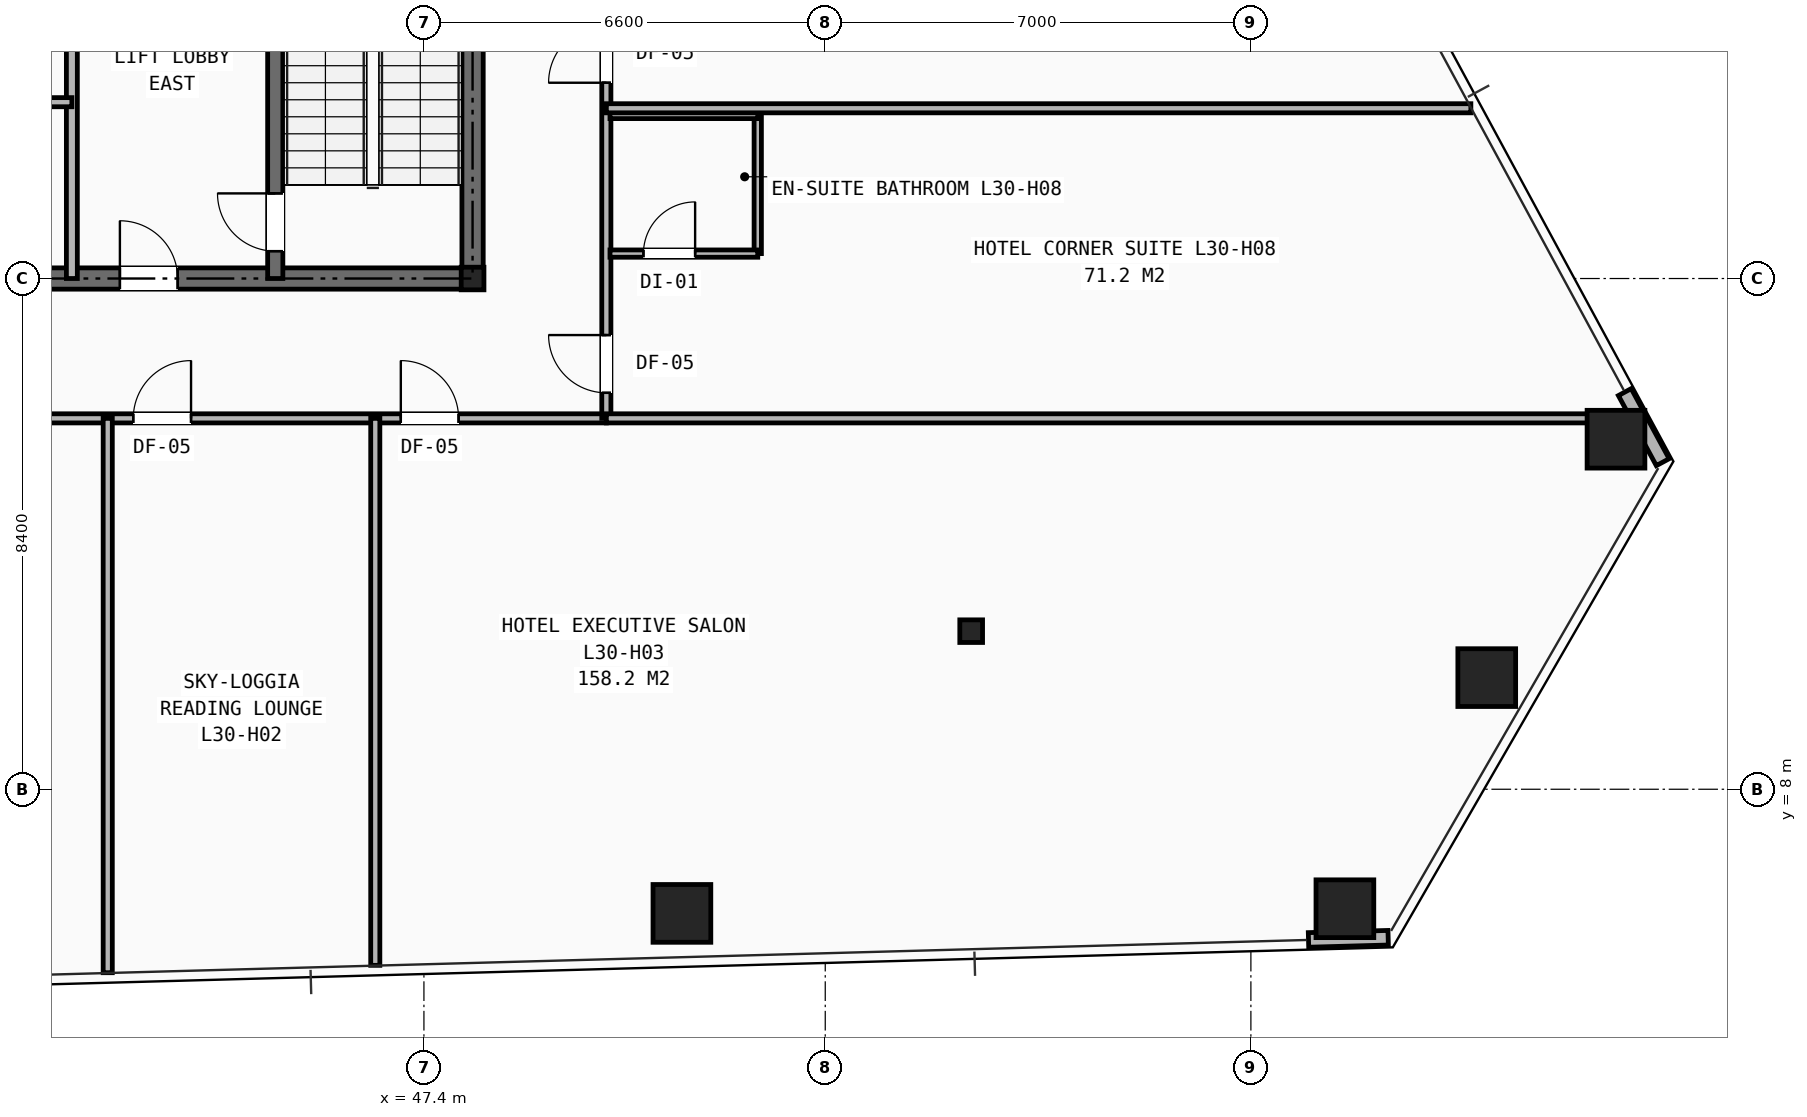
"""IFC4 building model, lengths in metres.
Left out: names, types, materials, properties, quantities, classifications, styles, units other than length and angle.
Written with IfcOpenShell. Run it as: python <this file> out.ifc"""

import sys

from ifc_helpers import new_model, si_unit, direction, frame, frame_2d, origin, origin_2d, place, context, subcontext, project, spatial, rectangle, hollow_rectangle, i_section, extrude, element, fill, save


model = new_model("IFC4")
c1 = context("Model", 3, precision=1e-05, world=origin(), true_north=direction((0.0, 1.0)))
c2 = subcontext(c1, "Body", "Model", "MODEL_VIEW")
j1 = project(units=[si_unit("LENGTHUNIT", "METRE"), si_unit("PLANEANGLEUNIT", "RADIAN")], contexts=[c1])
p1 = place(None, origin())
s1 = spatial("IfcSite", under=j1, at=p1, CompositionType="ELEMENT")
p2 = place(p1, origin())
s2 = spatial("IfcBuilding", under=s1, at=p2, CompositionType="ELEMENT")
p3 = place(p2, frame((0.0, 0.0, 105.4)))
s3 = spatial("IfcBuildingStorey", under=s2, at=p3, CompositionType="ELEMENT", Elevation=105.4)
for number, where, z_axis, x_axis in (
    (1, (48.2, 16.4, 0.0), (0.0, 0.0, 1.0), (1.0, 0.0, 0.0)),
    (2, (56.4, 10.6, 0.0), (0.0, 0.0, 1.0), (1.0, 0.0, 0.0)),
):
    element("IfcColumn", number, at=place(p3, frame(where, z_axis=z_axis, x_axis=x_axis)), inside=s3, PredefinedType="COLUMN", context=c2, shape_type="SweptSolid", body=[
        extrude(i_section(OverallWidth=0.374, OverallDepth=0.372, WebThickness=0.016, FlangeThickness=0.026, at=origin_2d()), origin(), (0.0, 0.0, 1.0), 3.2),
    ])
for number, where, z_axis, x_axis in (
    (3, (51.643, 5.958, 0.0), (0.0, 0.0, 1.0), (1.0, 0.0, 0.0)),
    (4, (62.546, 6.035, 0.0), (0.0, 0.0, 1.0), (1.0, 0.0, 0.0)),
    (5, (64.879, 9.836, 0.0), (0.0, 0.0, 1.0), (1.0, 0.0, 0.0)),
    (6, (67.004, 13.757, 0.0), (0.0, 0.0, 1.0), (1.0, 0.0, 0.0)),
):
    element("IfcColumn", number, at=place(p3, frame(where, z_axis=z_axis, x_axis=x_axis)), inside=s3, PredefinedType="COLUMN", context=c2, shape_type="SweptSolid", body=[
        extrude(hollow_rectangle(XDim=0.95, YDim=0.95, WallThickness=0.065, at=origin_2d()), origin(), (0.0, 0.0, 1.0), 3.2),
    ])
p4 = place(p3, frame((61.948, 5.522, 0.0), z_axis=(0.0, 0.0, 1.0), x_axis=(0.999614564295, 0.027761895635, 0.0)))
e7 = element("IfcWall", 7, at=p4, inside=s3, PredefinedType="SHEAR", context=c2, shape_type="SweptSolid", body=[
    extrude(rectangle(XDim=1.31, YDim=0.24, at=frame_2d((0.655, 0.0))), origin(), (0.0, 0.0, 1.0), 2.253),
])
p5 = place(p3, frame((67.773, 13.379, 0.0), z_axis=(0.0, 0.0, 1.0), x_axis=(-0.475820948293, 0.879542167929, 0.0)))
e8 = element("IfcWall", 8, at=p5, inside=s3, PredefinedType="SHEAR", context=c2, shape_type="SweptSolid", body=[
    extrude(rectangle(XDim=1.311, YDim=0.24, at=frame_2d((0.655, 0.0))), origin(), (0.0, 0.0, 1.0), 2.253),
])
p6 = place(p3, frame((31.8, 16.4, 0.0), z_axis=(0.0, 0.0, 1.0), x_axis=(1.0, 0.0, 0.0)))
e9 = element("IfcWall", 9, at=p6, inside=s3, PredefinedType="SHEAR", context=c2, shape_type="SweptSolid", body=[
    extrude(rectangle(XDim=16.4, YDim=0.35, at=frame_2d((8.2, 0.0))), origin(), (0.0, 0.0, 1.0), 2.97),
])
p7 = place(p6, frame((7.75, 0.0, 0.0)))
e10 = element("IfcOpeningElement", 10, at=p7, cuts=e9, PredefinedType="OPENING", context=c2, shape_type="SweptSolid", body=[
    extrude(rectangle(XDim=0.9, YDim=2.1, at=frame_2d((0.45, 1.05))), frame((0.0, 0.185, 0.0), z_axis=(0.0, -1.0, 0.0), x_axis=(1.0, 0.0, 0.0)), (0.0, 0.0, 1.0), 0.37),
])
p8 = place(p6, frame((4.2, 0.0, 0.0)))
e11 = element("IfcOpeningElement", 11, at=p8, cuts=e9, PredefinedType="OPENING", context=c2, shape_type="SweptSolid", body=[
    extrude(rectangle(XDim=0.95, YDim=2.1, at=frame_2d((0.475, 1.05))), frame((0.0, 0.185, 0.0), z_axis=(0.0, -1.0, 0.0), x_axis=(1.0, 0.0, 0.0)), (0.0, 0.0, 1.0), 0.37),
])
p9 = place(p6, frame((10.6, 0.0, 0.0)))
e12 = element("IfcOpeningElement", 12, at=p9, cuts=e9, PredefinedType="OPENING", context=c2, shape_type="SweptSolid", body=[
    extrude(rectangle(XDim=0.95, YDim=2.1, at=frame_2d((0.475, 1.05))), frame((0.0, 0.185, 0.0), z_axis=(0.0, -1.0, 0.0), x_axis=(1.0, 0.0, 0.0)), (0.0, 0.0, 1.0), 0.37),
])
p10 = place(p3, frame((48.2, 16.4, 0.0), z_axis=(0.0, 0.0, 1.0), x_axis=(0.0, 1.0, 0.0)))
e13 = element("IfcWall", 13, at=p10, inside=s3, PredefinedType="SHEAR", context=c2, shape_type="SweptSolid", body=[
    extrude(rectangle(XDim=14.8, YDim=0.35, at=frame_2d((7.4, 0.0))), origin(), (0.0, 0.0, 1.0), 2.97),
])
p11 = place(p10, frame((11.0, 0.0, 0.0)))
e14 = element("IfcOpeningElement", 14, at=p11, cuts=e13, PredefinedType="OPENING", context=c2, shape_type="SweptSolid", body=[
    extrude(rectangle(XDim=1.1, YDim=2.15, at=frame_2d((0.55, 1.075))), frame((0.0, 0.185, 0.0), z_axis=(0.0, -1.0, 0.0), x_axis=(1.0, 0.0, 0.0)), (0.0, 0.0, 1.0), 0.37),
])
p12 = place(p3, frame((44.955, 16.4, 0.0), z_axis=(0.0, 0.0, 1.0), x_axis=(0.0, 1.0, 0.0)))
e15 = element("IfcWall", 15, at=p12, inside=s3, PredefinedType="SHEAR", context=c2, shape_type="SweptSolid", body=[
    extrude(rectangle(XDim=8.4, YDim=0.25, at=frame_2d((4.2, 0.0))), origin(), (0.0, 0.0, 1.0), 2.97),
])
p13 = place(p12, frame((0.45, 0.0, 0.0)))
e16 = element("IfcOpeningElement", 16, at=p13, cuts=e15, PredefinedType="OPENING", context=c2, shape_type="SweptSolid", body=[
    extrude(rectangle(XDim=0.95, YDim=2.1, at=frame_2d((0.475, 1.05))), frame((0.0, 0.135, 0.0), z_axis=(0.0, -1.0, 0.0), x_axis=(1.0, 0.0, 0.0)), (0.0, 0.0, 1.0), 0.27),
])
p14 = place(p3, frame((41.61, 16.4, 0.0), z_axis=(0.0, 0.0, 1.0), x_axis=(0.0, 1.0, 0.0)))
e17 = element("IfcWall", 17, at=p14, inside=s3, PredefinedType="PARTITIONING", context=c2, shape_type="SweptSolid", body=[
    extrude(rectangle(XDim=8.4, YDim=0.18, at=frame_2d((4.2, 0.0))), origin(), (0.0, 0.0, 1.0), 2.698),
])
p15 = place(p3, frame((38.39, 19.3, 0.0), z_axis=(0.0, 0.0, 1.0), x_axis=(1.0, 0.0, 0.0)))
e18 = element("IfcWall", 18, at=p15, inside=s3, PredefinedType="PARTITIONING", context=c2, shape_type="SweptSolid", body=[
    extrude(rectangle(XDim=3.22, YDim=0.15, at=frame_2d((1.61, 0.0))), origin(), (0.0, 0.0, 1.0), 2.97),
])
p16 = place(p3, frame((29.6, 14.1, 0.0), z_axis=(0.0, 0.0, 1.0), x_axis=(1.0, 0.0, 0.0)))
e19 = element("IfcWall", 19, at=p16, inside=s3, PredefinedType="PARTITIONING", context=c2, shape_type="SweptSolid", body=[
    extrude(rectangle(XDim=20.8, YDim=0.15, at=frame_2d((10.4, 0.0))), origin(), (0.0, 0.0, 1.0), 2.421),
])
p17 = place(p16, frame((0.57, 0.0, 0.0)))
e20 = element("IfcOpeningElement", 20, at=p17, cuts=e19, PredefinedType="OPENING", context=c2, shape_type="SweptSolid", body=[
    extrude(rectangle(XDim=0.95, YDim=2.1, at=frame_2d((0.475, 1.05))), frame((0.0, 0.085, 0.0), z_axis=(0.0, -1.0, 0.0), x_axis=(1.0, 0.0, 0.0)), (0.0, 0.0, 1.0), 0.17),
])
p18 = place(p16, frame((13.02, 0.0, 0.0)))
e21 = element("IfcOpeningElement", 21, at=p18, cuts=e19, PredefinedType="OPENING", context=c2, shape_type="SweptSolid", body=[
    extrude(rectangle(XDim=0.95, YDim=2.1, at=frame_2d((0.475, 1.05))), frame((0.0, 0.085, 0.0), z_axis=(0.0, -1.0, 0.0), x_axis=(1.0, 0.0, 0.0)), (0.0, 0.0, 1.0), 0.17),
])
p19 = place(p16, frame((17.42, 0.0, 0.0)))
e22 = element("IfcOpeningElement", 22, at=p19, cuts=e19, PredefinedType="OPENING", context=c2, shape_type="SweptSolid", body=[
    extrude(rectangle(XDim=0.95, YDim=2.1, at=frame_2d((0.475, 1.05))), frame((0.0, 0.085, 0.0), z_axis=(0.0, -1.0, 0.0), x_axis=(1.0, 0.0, 0.0)), (0.0, 0.0, 1.0), 0.17),
])
p20 = place(p3, frame((50.4, 14.1, 0.0), z_axis=(0.0, 0.0, 1.0), x_axis=(0.0, 1.0, 0.0)))
e23 = element("IfcWall", 23, at=p20, inside=s3, PredefinedType="PARTITIONING", context=c2, shape_type="SweptSolid", body=[
    extrude(rectangle(XDim=21.9, YDim=0.15, at=frame_2d((10.95, 0.0))), origin(), (0.0, 0.0, 1.0), 2.421),
])
p21 = place(p20, frame((0.42, 0.0, 0.0)))
e24 = element("IfcOpeningElement", 24, at=p21, cuts=e23, PredefinedType="OPENING", context=c2, shape_type="SweptSolid", body=[
    extrude(rectangle(XDim=0.95, YDim=2.1, at=frame_2d((0.475, 1.05))), frame((0.0, 0.085, 0.0), z_axis=(0.0, -1.0, 0.0), x_axis=(1.0, 0.0, 0.0)), (0.0, 0.0, 1.0), 0.17),
])
p22 = place(p20, frame((5.52, 0.0, 0.0)))
e25 = element("IfcOpeningElement", 25, at=p22, cuts=e23, PredefinedType="OPENING", context=c2, shape_type="SweptSolid", body=[
    extrude(rectangle(XDim=0.95, YDim=2.1, at=frame_2d((0.475, 1.05))), frame((0.0, 0.085, 0.0), z_axis=(0.0, -1.0, 0.0), x_axis=(1.0, 0.0, 0.0)), (0.0, 0.0, 1.0), 0.17),
])
p23 = place(p20, frame((10.92, 0.0, 0.0)))
e26 = element("IfcOpeningElement", 26, at=p23, cuts=e23, PredefinedType="OPENING", context=c2, shape_type="SweptSolid", body=[
    extrude(rectangle(XDim=0.95, YDim=2.1, at=frame_2d((0.475, 1.05))), frame((0.0, 0.085, 0.0), z_axis=(0.0, -1.0, 0.0), x_axis=(1.0, 0.0, 0.0)), (0.0, 0.0, 1.0), 0.17),
])
p24 = place(p20, frame((16.72, 0.0, 0.0)))
e27 = element("IfcOpeningElement", 27, at=p24, cuts=e23, PredefinedType="OPENING", context=c2, shape_type="SweptSolid", body=[
    extrude(rectangle(XDim=0.95, YDim=2.1, at=frame_2d((0.475, 1.05))), frame((0.0, 0.085, 0.0), z_axis=(0.0, -1.0, 0.0), x_axis=(1.0, 0.0, 0.0)), (0.0, 0.0, 1.0), 0.17),
])
p25 = place(p3, frame((42.2, 4.983, 0.0), z_axis=(0.0, 0.0, 1.0), x_axis=(0.0, 1.0, 0.0)))
e28 = element("IfcWall", 28, at=p25, inside=s3, PredefinedType="PARTITIONING", context=c2, shape_type="SweptSolid", body=[
    extrude(rectangle(XDim=9.117, YDim=0.15, at=frame_2d((4.559, 0.0))), origin(), (0.0, 0.0, 1.0), 2.258),
])
p26 = place(p3, frame((46.6, 5.104, 0.0), z_axis=(0.0, 0.0, 1.0), x_axis=(0.0, 1.0, 0.0)))
e29 = element("IfcWall", 29, at=p26, inside=s3, PredefinedType="PARTITIONING", context=c2, shape_type="SweptSolid", body=[
    extrude(rectangle(XDim=8.996, YDim=0.15, at=frame_2d((4.498, 0.0))), origin(), (0.0, 0.0, 1.0), 2.258),
])
p27 = place(p3, frame((50.4, 14.1, 0.0), z_axis=(0.0, 0.0, 1.0), x_axis=(1.0, 0.0, 0.0)))
e30 = element("IfcWall", 30, at=p27, inside=s3, PredefinedType="PARTITIONING", context=c2, shape_type="SweptSolid", body=[
    extrude(rectangle(XDim=16.978, YDim=0.15, at=frame_2d((8.489, 0.0))), origin(), (0.0, 0.0, 1.0), 2.258),
])
p28 = place(p3, frame((52.89, 16.81, 0.0), z_axis=(0.0, 0.0, 1.0), x_axis=(0.0, 1.0, 0.0)))
e31 = element("IfcWall", 31, at=p28, inside=s3, PredefinedType="PARTITIONING", context=c2, shape_type="SweptSolid", body=[
    extrude(rectangle(XDim=2.28, YDim=0.12, at=frame_2d((1.14, 0.0))), origin(), (0.0, 0.0, 1.0), 2.97),
])
p29 = place(p3, frame((50.46, 16.81, 0.0), z_axis=(0.0, 0.0, 1.0), x_axis=(1.0, 0.0, 0.0)))
e32 = element("IfcWall", 32, at=p29, inside=s3, PredefinedType="PARTITIONING", context=c2, shape_type="SweptSolid", body=[
    extrude(rectangle(XDim=2.43, YDim=0.12, at=frame_2d((1.215, 0.0))), origin(), (0.0, 0.0, 1.0), 2.97),
])
p30 = place(p29, frame((0.55, 0.0, 0.0)))
e33 = element("IfcOpeningElement", 33, at=p30, cuts=e32, PredefinedType="OPENING", context=c2, shape_type="SweptSolid", body=[
    extrude(rectangle(XDim=0.85, YDim=2.05, at=frame_2d((0.425, 1.025))), frame((0.0, 0.07, 0.0), z_axis=(0.0, -1.0, 0.0), x_axis=(1.0, 0.0, 0.0)), (0.0, 0.0, 1.0), 0.14),
])
p31 = place(p3, frame((50.46, 19.09, 0.0), z_axis=(0.0, 0.0, 1.0), x_axis=(1.0, 0.0, 0.0)))
e34 = element("IfcWall", 34, at=p31, inside=s3, PredefinedType="PARTITIONING", context=c2, shape_type="SweptSolid", body=[
    extrude(rectangle(XDim=2.43, YDim=0.12, at=frame_2d((1.215, 0.0))), origin(), (0.0, 0.0, 1.0), 2.97),
])
p32 = place(p3, frame((50.4, 19.2, 0.0), z_axis=(0.0, 0.0, 1.0), x_axis=(1.0, 0.0, 0.0)))
e35 = element("IfcWall", 35, at=p32, inside=s3, PredefinedType="PARTITIONING", context=c2, shape_type="SweptSolid", body=[
    extrude(rectangle(XDim=14.218, YDim=0.15, at=frame_2d((7.109, 0.0))), origin(), (0.0, 0.0, 1.0), 2.258),
])
p33 = place(p13, origin())
e36 = element("IfcDoor", 36, at=p33, inside=s3, OperationType="SINGLE_SWING_RIGHT", PredefinedType="DOOR", context=c2, shape_type="SweptSolid", body=[
    extrude(rectangle(XDim=0.95, YDim=2.1, at=frame_2d((0.475, 1.05))), frame((0.0, 0.025, 0.0), z_axis=(0.0, -1.0, 0.0), x_axis=(1.0, 0.0, 0.0)), (0.0, 0.0, 1.0), 0.05),
])
fill(e16, e36)
p34 = place(p9, origin())
e37 = element("IfcDoor", 37, at=p34, inside=s3, OperationType="SINGLE_SWING_LEFT", PredefinedType="DOOR", context=c2, shape_type="SweptSolid", body=[
    extrude(rectangle(XDim=0.95, YDim=2.1, at=frame_2d((0.475, 1.05))), frame((0.0, 0.025, 0.0), z_axis=(0.0, -1.0, 0.0), x_axis=(1.0, 0.0, 0.0)), (0.0, 0.0, 1.0), 0.05),
])
fill(e12, e37)
p35 = place(p18, origin())
e38 = element("IfcDoor", 38, at=p35, inside=s3, OperationType="SINGLE_SWING_RIGHT", PredefinedType="DOOR", context=c2, shape_type="SweptSolid", body=[
    extrude(rectangle(XDim=0.95, YDim=2.1, at=frame_2d((0.475, 1.05))), frame((0.0, 0.025, 0.0), z_axis=(0.0, -1.0, 0.0), x_axis=(1.0, 0.0, 0.0)), (0.0, 0.0, 1.0), 0.05),
])
fill(e21, e38)
p36 = place(p19, origin())
e39 = element("IfcDoor", 39, at=p36, inside=s3, OperationType="SINGLE_SWING_LEFT", PredefinedType="DOOR", context=c2, shape_type="SweptSolid", body=[
    extrude(rectangle(XDim=0.95, YDim=2.1, at=frame_2d((0.475, 1.05))), frame((0.0, 0.025, 0.0), z_axis=(0.0, -1.0, 0.0), x_axis=(1.0, 0.0, 0.0)), (0.0, 0.0, 1.0), 0.05),
])
fill(e22, e39)
p37 = place(p21, origin())
e40 = element("IfcDoor", 40, at=p37, inside=s3, OperationType="SINGLE_SWING_RIGHT", PredefinedType="DOOR", context=c2, shape_type="SweptSolid", body=[
    extrude(rectangle(XDim=0.95, YDim=2.1, at=frame_2d((0.475, 1.05))), frame((0.0, 0.025, 0.0), z_axis=(0.0, -1.0, 0.0), x_axis=(1.0, 0.0, 0.0)), (0.0, 0.0, 1.0), 0.05),
])
fill(e24, e40)
p38 = place(p30, origin())
e41 = element("IfcDoor", 41, at=p38, inside=s3, OperationType="SINGLE_SWING_RIGHT", PredefinedType="DOOR", context=c2, shape_type="SweptSolid", body=[
    extrude(rectangle(XDim=0.85, YDim=2.05, at=frame_2d((0.425, 1.025))), frame((0.0, 0.025, 0.0), z_axis=(0.0, -1.0, 0.0), x_axis=(1.0, 0.0, 0.0)), (0.0, 0.0, 1.0), 0.05),
])
fill(e33, e41)
p39 = place(p22, origin())
e42 = element("IfcDoor", 42, at=p39, inside=s3, OperationType="SINGLE_SWING_LEFT", PredefinedType="DOOR", context=c2, shape_type="SweptSolid", body=[
    extrude(rectangle(XDim=0.95, YDim=2.1, at=frame_2d((0.475, 1.05))), frame((0.0, 0.025, 0.0), z_axis=(0.0, -1.0, 0.0), x_axis=(1.0, 0.0, 0.0)), (0.0, 0.0, 1.0), 0.05),
])
fill(e25, e42)
save(model, sys.argv[1])
